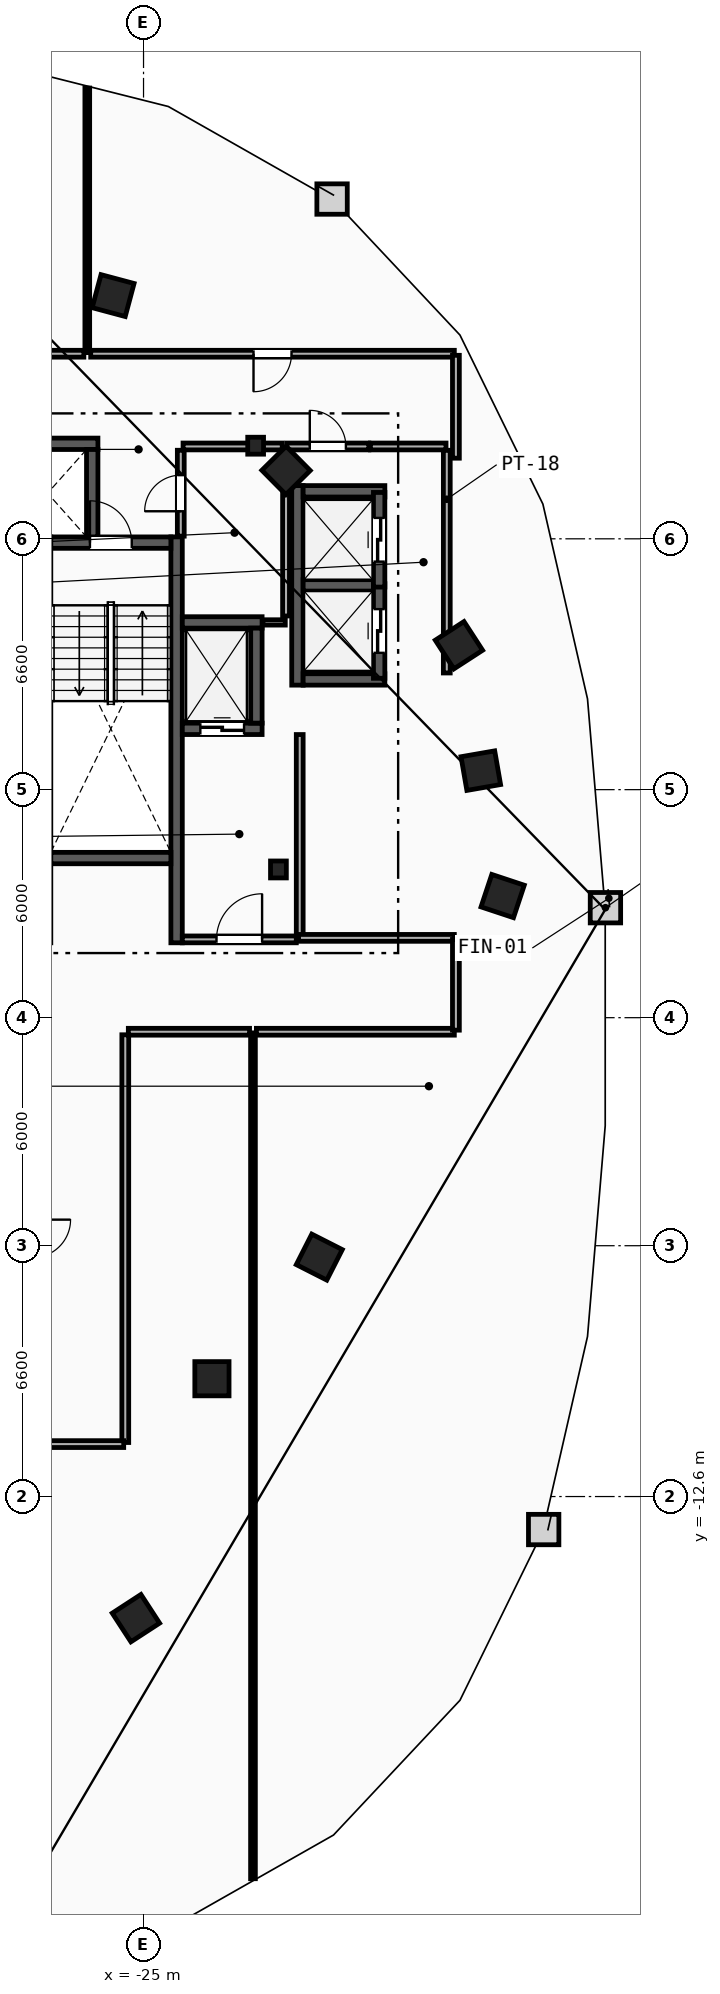
"""IFC4 building model, lengths in metres.
Left out: names, types, materials, properties, quantities, classifications, styles, units other than length and angle.
Written with IfcOpenShell. Run it as: python <this file> out.ifc"""

import sys

from ifc_helpers import new_model, si_unit, direction, frame, frame_2d, origin, origin_2d, place, context, subcontext, project, spatial, rectangle, i_section, extrude, element, fill, save


model = new_model("IFC4")
c1 = context("Model", 3, precision=1e-05, world=origin(), true_north=direction((0.0, 1.0)))
c2 = subcontext(c1, "Body", "Model", "MODEL_VIEW")
j1 = project(units=[si_unit("LENGTHUNIT", "METRE"), si_unit("PLANEANGLEUNIT", "RADIAN")], contexts=[c1])
p1 = place(None, origin())
s1 = spatial("IfcSite", under=j1, at=p1, CompositionType="ELEMENT")
p2 = place(p1, origin())
s2 = spatial("IfcBuilding", under=s1, at=p2, CompositionType="ELEMENT")
p3 = place(p2, frame((0.0, 0.0, 199.0)))
s3 = spatial("IfcBuildingStorey", under=s2, at=p3, CompositionType="ELEMENT", Elevation=199.0)
for number, where, z_axis, x_axis in (
    (1, (-21.45, 3.9, 0.0), (0.0, 0.0, 1.0), (1.0, 0.0, 0.0)),
    (2, (-22.05, 15.05, 0.0), (0.0, 0.0, 1.0), (1.0, 0.0, 0.0)),
):
    element("IfcColumn", number, at=place(p3, frame(where, z_axis=z_axis, x_axis=x_axis)), inside=s3, PredefinedType="COLUMN", context=c2, shape_type="SweptSolid", body=[
        extrude(i_section(OverallWidth=0.416, OverallDepth=0.446, WebThickness=0.039, FlangeThickness=0.063, FilletRadius=0.018, at=origin_2d()), origin(), (0.0, 0.0, 1.0), 3.6),
    ])
for number, where, z_axis, x_axis in (
    (3, (-23.2, -9.5, 0.0), (0.0, 0.0, 1.0), (1.0, 0.0, 0.0)),
    (4, (-15.55, 3.2, 0.0), (0.0, 0.0, 1.0), (0.315, 0.949, 0.0)),
    (5, (-16.125, 6.5, 0.0), (0.0, 0.0, 1.0), (-0.172, 0.985, 0.0)),
    (6, (-16.7, 9.8, 0.0), (0.0, 0.0, 1.0), (-0.544, 0.839, 0.0)),
    (7, (-21.25, 14.4, 0.0), (0.0, 0.0, 1.0), (-0.703, 0.711, 0.0)),
    (8, (-25.8, 19.0, 0.0), (0.0, 0.0, 1.0), (-0.966, 0.259, 0.0)),
    (9, (-25.2, -15.8, 0.0), (0.0, 0.0, 1.0), (0.838, 0.546, 0.0)),
    (10, (-20.375, -6.3, 0.0), (0.0, 0.0, 1.0), (0.453, 0.892, 0.0)),
):
    element("IfcColumn", number, at=place(p3, frame(where, z_axis=z_axis, x_axis=x_axis)), inside=s3, PredefinedType="COLUMN", context=c2, shape_type="SweptSolid", body=[
        extrude(rectangle(XDim=0.9, YDim=0.9, at=origin_2d()), origin(), (0.0, 0.0, 1.0), 3.6),
    ])
p4 = place(p3, frame((-24.13, 1.97, 0.0), z_axis=(0.0, 0.0, 1.0), x_axis=(0.0, 1.0, 0.0)))
e11 = element("IfcWall", 11, at=p4, inside=s3, PredefinedType="SHEAR", context=c2, shape_type="SweptSolid", body=[
    extrude(rectangle(XDim=10.68, YDim=0.3, at=frame_2d((5.34, 0.0))), origin(), (0.0, 0.0, 1.0), 3.34),
])
p5 = place(p3, frame((-27.44, 12.5, 0.0), z_axis=(0.0, 0.0, 1.0), x_axis=(1.0, 0.0, 0.0)))
e12 = element("IfcWall", 12, at=p5, inside=s3, PredefinedType="SHEAR", context=c2, shape_type="SweptSolid", body=[
    extrude(rectangle(XDim=3.16, YDim=0.3, at=frame_2d((1.58, 0.0))), origin(), (0.0, 0.0, 1.0), 3.34),
])
p6 = place(p5, frame((1.03, 0.0, 0.0)))
e13 = element("IfcOpeningElement", 13, at=p6, cuts=e12, PredefinedType="OPENING", context=c2, shape_type="SweptSolid", body=[
    extrude(rectangle(XDim=1.1, YDim=2.15, at=frame_2d((0.55, 1.075))), frame((0.0, 0.16, 0.0), z_axis=(0.0, -1.0, 0.0), x_axis=(1.0, 0.0, 0.0)), (0.0, 0.0, 1.0), 0.32),
])
p7 = place(p3, frame((-27.44, 4.2, 0.0), z_axis=(0.0, 0.0, 1.0), x_axis=(1.0, 0.0, 0.0)))
e14 = element("IfcWall", 14, at=p7, inside=s3, PredefinedType="SHEAR", context=c2, shape_type="SweptSolid", body=[
    extrude(rectangle(XDim=3.16, YDim=0.3, at=frame_2d((1.58, 0.0))), origin(), (0.0, 0.0, 1.0), 3.34),
])
p8 = place(p3, frame((-20.89, 2.15, 0.0), z_axis=(0.0, 0.0, 1.0), x_axis=(0.0, 1.0, 0.0)))
e15 = element("IfcWall", 15, at=p8, inside=s3, PredefinedType="PARTITIONING", context=c2, shape_type="SweptSolid", body=[
    extrude(rectangle(XDim=5.3, YDim=0.18, at=frame_2d((2.65, 0.0))), origin(), (0.0, 0.0, 1.0), 3.34),
])
p9 = place(p3, frame((-23.98, 2.06, 0.0), z_axis=(0.0, 0.0, 1.0), x_axis=(1.0, 0.0, 0.0)))
e16 = element("IfcWall", 16, at=p9, inside=s3, PredefinedType="PARTITIONING", context=c2, shape_type="SweptSolid", body=[
    extrude(rectangle(XDim=3.0, YDim=0.18, at=frame_2d((1.5, 0.0))), origin(), (0.0, 0.0, 1.0), 3.34),
])
p10 = place(p9, frame((0.9, 0.0, 0.0)))
e17 = element("IfcOpeningElement", 17, at=p10, cuts=e16, PredefinedType="OPENING", context=c2, shape_type="SweptSolid", body=[
    extrude(rectangle(XDim=1.2, YDim=2.15, at=frame_2d((0.6, 1.075))), frame((0.0, 0.1, 0.0), z_axis=(0.0, -1.0, 0.0), x_axis=(1.0, 0.0, 0.0)), (0.0, 0.0, 1.0), 0.2),
])
p11 = place(p3, frame((-23.98, 7.6, 0.0), z_axis=(0.0, 0.0, 1.0), x_axis=(1.0, 0.0, 0.0)))
e18 = element("IfcWall", 18, at=p11, inside=s3, PredefinedType="SHEAR", context=c2, shape_type="SweptSolid", body=[
    extrude(rectangle(XDim=2.1, YDim=0.3, at=frame_2d((1.05, 0.0))), origin(), (0.0, 0.0, 1.0), 3.34),
])
p12 = place(p11, frame((0.475, 0.0, 0.0)))
e19 = element("IfcOpeningElement", 19, at=p12, cuts=e18, PredefinedType="OPENING", context=c2, shape_type="SweptSolid", body=[
    extrude(rectangle(XDim=1.15, YDim=2.2, at=frame_2d((0.575, 1.1))), frame((0.0, 0.16, 0.0), z_axis=(0.0, -1.0, 0.0), x_axis=(1.0, 0.0, 0.0)), (0.0, 0.0, 1.0), 0.32),
])
p13 = place(p3, frame((-23.98, 10.4, 0.0), z_axis=(0.0, 0.0, 1.0), x_axis=(1.0, 0.0, 0.0)))
e20 = element("IfcWall", 20, at=p13, inside=s3, PredefinedType="SHEAR", context=c2, shape_type="SweptSolid", body=[
    extrude(rectangle(XDim=2.1, YDim=0.3, at=frame_2d((1.05, 0.0))), origin(), (0.0, 0.0, 1.0), 3.34),
])
for number, where, z_axis, x_axis in (
    (21, (-22.03, 7.75, 0.0), (0.0, 0.0, 1.0), (0.0, 1.0, 0.0)),
    (22, (-28.7, 15.1, 0.0), (0.0, 0.0, 1.0), (1.0, 0.0, 0.0)),
):
    element("IfcWall", number, at=place(p3, frame(where, z_axis=z_axis, x_axis=x_axis)), inside=s3, PredefinedType="SHEAR", context=c2, shape_type="SweptSolid", body=[
        extrude(rectangle(XDim=2.5, YDim=0.3, at=frame_2d((1.25, 0.0))), origin(), (0.0, 0.0, 1.0), 3.34),
    ])
p14 = place(p3, frame((-26.35, 12.65, 0.0), z_axis=(0.0, 0.0, 1.0), x_axis=(0.0, 1.0, 0.0)))
e23 = element("IfcWall", 23, at=p14, inside=s3, PredefinedType="SHEAR", context=c2, shape_type="SweptSolid", body=[
    extrude(rectangle(XDim=2.3, YDim=0.3, at=frame_2d((1.15, 0.0))), origin(), (0.0, 0.0, 1.0), 3.34),
])
p15 = place(p3, frame((-20.95, 8.75, 0.0), z_axis=(0.0, 0.0, 1.0), x_axis=(0.0, 1.0, 0.0)))
e24 = element("IfcWall", 24, at=p15, inside=s3, PredefinedType="SHEAR", context=c2, shape_type="SweptSolid", body=[
    extrude(rectangle(XDim=5.25, YDim=0.3, at=frame_2d((2.625, 0.0))), origin(), (0.0, 0.0, 1.0), 3.34),
])
for number, where, z_axis, x_axis in (
    (25, (-20.8, 8.9, 0.0), (0.0, 0.0, 1.0), (1.0, 0.0, 0.0)),
    (26, (-20.8, 13.85, 0.0), (0.0, 0.0, 1.0), (1.0, 0.0, 0.0)),
):
    element("IfcWall", number, at=place(p3, frame(where, z_axis=z_axis, x_axis=x_axis)), inside=s3, PredefinedType="SHEAR", context=c2, shape_type="SweptSolid", body=[
        extrude(rectangle(XDim=2.15, YDim=0.3, at=frame_2d((1.075, 0.0))), origin(), (0.0, 0.0, 1.0), 3.34),
    ])
p16 = place(p3, frame((-20.8, 11.375, 0.0), z_axis=(0.0, 0.0, 1.0), x_axis=(1.0, 0.0, 0.0)))
e27 = element("IfcWall", 27, at=p16, inside=s3, PredefinedType="SHEAR", context=c2, shape_type="SweptSolid", body=[
    extrude(rectangle(XDim=1.85, YDim=0.3, at=frame_2d((0.925, 0.0))), origin(), (0.0, 0.0, 1.0), 3.34),
])
p17 = place(p3, frame((-18.8, 8.93, 0.0), z_axis=(0.0, 0.0, 1.0), x_axis=(0.0, 1.0, 0.0)))
e28 = element("IfcWall", 28, at=p17, inside=s3, PredefinedType="SHEAR", context=c2, shape_type="SweptSolid", body=[
    extrude(rectangle(XDim=2.49, YDim=0.3, at=frame_2d((1.245, 0.0))), origin(), (0.0, 0.0, 1.0), 3.34),
])
p18 = place(p17, frame((0.67, 0.0, 0.0)))
e29 = element("IfcOpeningElement", 29, at=p18, cuts=e28, PredefinedType="OPENING", context=c2, shape_type="SweptSolid", body=[
    extrude(rectangle(XDim=1.15, YDim=2.2, at=frame_2d((0.575, 1.1))), frame((0.0, 0.16, 0.0), z_axis=(0.0, -1.0, 0.0), x_axis=(1.0, 0.0, 0.0)), (0.0, 0.0, 1.0), 0.32),
])
p19 = place(p3, frame((-18.8, 11.33, 0.0), z_axis=(0.0, 0.0, 1.0), x_axis=(0.0, 1.0, 0.0)))
e30 = element("IfcWall", 30, at=p19, inside=s3, PredefinedType="SHEAR", context=c2, shape_type="SweptSolid", body=[
    extrude(rectangle(XDim=2.49, YDim=0.3, at=frame_2d((1.245, 0.0))), origin(), (0.0, 0.0, 1.0), 3.34),
])
p20 = place(p19, frame((0.67, 0.0, 0.0)))
e31 = element("IfcOpeningElement", 31, at=p20, cuts=e30, PredefinedType="OPENING", context=c2, shape_type="SweptSolid", body=[
    extrude(rectangle(XDim=1.15, YDim=2.2, at=frame_2d((0.575, 1.1))), frame((0.0, 0.16, 0.0), z_axis=(0.0, -1.0, 0.0), x_axis=(1.0, 0.0, 0.0)), (0.0, 0.0, 1.0), 0.32),
])
p21 = place(p3, frame((-17.02, 9.07, 0.0), z_axis=(0.0, 0.0, 1.0), x_axis=(0.0, 1.0, 0.0)))
e32 = element("IfcWall", 32, at=p21, inside=s3, PredefinedType="PARTITIONING", context=c2, shape_type="SweptSolid", body=[
    extrude(rectangle(XDim=5.86, YDim=0.18, at=frame_2d((2.93, 0.0))), origin(), (0.0, 0.0, 1.0), 3.34),
])
p22 = place(p3, frame((-21.23, 15.03, 0.0), z_axis=(0.0, 0.0, 1.0), x_axis=(1.0, 0.0, 0.0)))
e33 = element("IfcWall", 33, at=p22, inside=s3, PredefinedType="PARTITIONING", context=c2, shape_type="SweptSolid", body=[
    extrude(rectangle(XDim=2.16, YDim=0.18, at=frame_2d((1.08, 0.0))), origin(), (0.0, 0.0, 1.0), 3.34),
])
p23 = place(p22, frame((0.605, 0.0, 0.0)))
e34 = element("IfcOpeningElement", 34, at=p23, cuts=e33, PredefinedType="OPENING", context=c2, shape_type="SweptSolid", body=[
    extrude(rectangle(XDim=0.95, YDim=2.1, at=frame_2d((0.475, 1.05))), frame((0.0, 0.1, 0.0), z_axis=(0.0, -1.0, 0.0), x_axis=(1.0, 0.0, 0.0)), (0.0, 0.0, 1.0), 0.2),
])
p24 = place(p3, frame((-19.03, 15.03, 0.0), z_axis=(0.0, 0.0, 1.0), x_axis=(1.0, 0.0, 0.0)))
e35 = element("IfcWall", 35, at=p24, inside=s3, PredefinedType="PARTITIONING", context=c2, shape_type="SweptSolid", body=[
    extrude(rectangle(XDim=1.99, YDim=0.18, at=frame_2d((0.995, 0.0))), origin(), (0.0, 0.0, 1.0), 3.34),
])
p25 = place(p3, frame((-21.86, 10.4, 0.0), z_axis=(0.0, 0.0, 1.0), x_axis=(1.0, 0.0, 0.0)))
e36 = element("IfcWall", 36, at=p25, inside=s3, PredefinedType="PARTITIONING", context=c2, shape_type="SweptSolid", body=[
    extrude(rectangle(XDim=0.59, YDim=0.14, at=frame_2d((0.295, 0.0))), origin(), (0.0, 0.0, 1.0), 3.34),
])
p26 = place(p3, frame((-21.25, 10.57, 0.0), z_axis=(0.0, 0.0, 1.0), x_axis=(0.0, 1.0, 0.0)))
e37 = element("IfcWall", 37, at=p26, inside=s3, PredefinedType="PARTITIONING", context=c2, shape_type="SweptSolid", body=[
    extrude(rectangle(XDim=4.36, YDim=0.18, at=frame_2d((2.18, 0.0))), origin(), (0.0, 0.0, 1.0), 3.34),
])
p27 = place(p3, frame((-23.96, 15.03, 0.0), z_axis=(0.0, 0.0, 1.0), x_axis=(1.0, 0.0, 0.0)))
e38 = element("IfcWall", 38, at=p27, inside=s3, PredefinedType="PARTITIONING", context=c2, shape_type="SweptSolid", body=[
    extrude(rectangle(XDim=2.61, YDim=0.18, at=frame_2d((1.305, 0.0))), origin(), (0.0, 0.0, 1.0), 2.413),
])
p28 = place(p3, frame((-24.02, 12.67, 0.0), z_axis=(0.0, 0.0, 1.0), x_axis=(0.0, 1.0, 0.0)))
e39 = element("IfcWall", 39, at=p28, inside=s3, PredefinedType="PARTITIONING", context=c2, shape_type="SweptSolid", body=[
    extrude(rectangle(XDim=2.26, YDim=0.18, at=frame_2d((1.13, 0.0))), origin(), (0.0, 0.0, 1.0), 3.34),
])
p29 = place(p28, frame((0.655, 0.0, 0.0)))
e40 = element("IfcOpeningElement", 40, at=p29, cuts=e39, PredefinedType="OPENING", context=c2, shape_type="SweptSolid", body=[
    extrude(rectangle(XDim=0.95, YDim=2.1, at=frame_2d((0.475, 1.05))), frame((0.0, 0.1, 0.0), z_axis=(0.0, -1.0, 0.0), x_axis=(1.0, 0.0, 0.0)), (0.0, 0.0, 1.0), 0.2),
])
p30 = place(p3, frame((-22.12, -22.656, 0.0), z_axis=(0.0, 0.0, 1.0), x_axis=(0.0, 1.0, 0.0)))
e41 = element("IfcWall", 41, at=p30, inside=s3, PredefinedType="PARTITIONING", context=c2, shape_type="SweptSolid", body=[
    extrude(rectangle(XDim=22.256, YDim=0.125, at=frame_2d((11.128, 0.0))), origin(), (0.0, 0.0, 1.0), 2.724),
])
p31 = place(p3, frame((-26.48, 17.5, 0.0), z_axis=(0.0, 0.0, 1.0), x_axis=(0.0, 1.0, 0.0)))
e42 = element("IfcWall", 42, at=p31, inside=s3, PredefinedType="PARTITIONING", context=c2, shape_type="SweptSolid", body=[
    extrude(rectangle(XDim=6.961, YDim=0.125, at=frame_2d((3.48, 0.0))), origin(), (0.0, 0.0, 1.0), 3.34),
])
p32 = place(p3, frame((-25.48, -11.178, 0.0), z_axis=(0.0, 0.0, 1.0), x_axis=(0.0, 1.0, 0.0)))
e43 = element("IfcWall", 43, at=p32, inside=s3, PredefinedType="PARTITIONING", context=c2, shape_type="SweptSolid", body=[
    extrude(rectangle(XDim=10.729, YDim=0.18, at=frame_2d((5.364, 0.0))), origin(), (0.0, 0.0, 1.0), 3.34),
])
p33 = place(p3, frame((-25.4, -0.37, 0.0), z_axis=(0.0, 0.0, 1.0), x_axis=(1.0, 0.0, 0.0)))
e44 = element("IfcWall", 44, at=p33, inside=s3, PredefinedType="PARTITIONING", context=c2, shape_type="SweptSolid", body=[
    extrude(rectangle(XDim=3.19, YDim=0.18, at=frame_2d((1.595, 0.0))), origin(), (0.0, 0.0, 1.0), 3.34),
])
p34 = place(p3, frame((-27.878, -11.22, 0.0), z_axis=(0.0, 0.0, 1.0), x_axis=(1.0, 0.0, 0.0)))
e45 = element("IfcWall", 45, at=p34, inside=s3, PredefinedType="PARTITIONING", context=c2, shape_type="SweptSolid", body=[
    extrude(rectangle(XDim=2.357, YDim=0.18, at=frame_2d((1.178, 0.0))), origin(), (0.0, 0.0, 1.0), 3.34),
])
p35 = place(p3, frame((-16.822, 17.47, 0.0), z_axis=(0.0, 0.0, 1.0), x_axis=(-1.0, 0.0, 0.0)))
e46 = element("IfcWall", 46, at=p35, inside=s3, PredefinedType="PARTITIONING", context=c2, shape_type="SweptSolid", body=[
    extrude(rectangle(XDim=9.568, YDim=0.18, at=frame_2d((4.784, 0.0))), origin(), (0.0, 0.0, 1.0), 3.34),
])
p36 = place(p35, frame((4.284, 0.0, 0.0)))
e47 = element("IfcOpeningElement", 47, at=p36, cuts=e46, PredefinedType="OPENING", context=c2, shape_type="SweptSolid", body=[
    extrude(rectangle(XDim=1.0, YDim=2.15, at=frame_2d((0.5, 1.075))), frame((0.0, 0.1, 0.0), z_axis=(0.0, -1.0, 0.0), x_axis=(1.0, 0.0, 0.0)), (0.0, 0.0, 1.0), 0.2),
])
p37 = place(p3, frame((-22.03, -0.37, 0.0), z_axis=(0.0, 0.0, 1.0), x_axis=(1.0, 0.0, 0.0)))
e48 = element("IfcWall", 48, at=p37, inside=s3, PredefinedType="PARTITIONING", context=c2, shape_type="SweptSolid", body=[
    extrude(rectangle(XDim=5.208, YDim=0.18, at=frame_2d((2.604, 0.0))), origin(), (0.0, 0.0, 1.0), 3.34),
])
p38 = place(p3, frame((-16.822, 2.1, 0.0), z_axis=(0.0, 0.0, 1.0), x_axis=(-1.0, 0.0, 0.0)))
e49 = element("IfcWall", 49, at=p38, inside=s3, PredefinedType="PARTITIONING", context=c2, shape_type="SweptSolid", body=[
    extrude(rectangle(XDim=4.098, YDim=0.18, at=frame_2d((2.049, 0.0))), origin(), (0.0, 0.0, 1.0), 3.34),
])
p39 = place(p3, frame((-16.78, 14.721, 0.0), z_axis=(0.0, 0.0, 1.0), x_axis=(0.0, 1.0, 0.0)))
e50 = element("IfcWall", 50, at=p39, inside=s3, PredefinedType="PARTITIONING", context=c2, shape_type="SweptSolid", body=[
    extrude(rectangle(XDim=2.707, YDim=0.18, at=frame_2d((1.354, 0.0))), origin(), (0.0, 0.0, 1.0), 3.34),
])
p40 = place(p3, frame((-16.78, -0.329, 0.0), z_axis=(0.0, 0.0, 1.0), x_axis=(0.0, 1.0, 0.0)))
e51 = element("IfcWall", 51, at=p40, inside=s3, PredefinedType="PARTITIONING", context=c2, shape_type="SweptSolid", body=[
    extrude(rectangle(XDim=2.387, YDim=0.18, at=frame_2d((1.194, 0.0))), origin(), (0.0, 0.0, 1.0), 3.34),
])
p41 = place(p3, frame((-26.57, 17.47, 0.0), z_axis=(0.0, 0.0, 1.0), x_axis=(-1.0, 0.0, 0.0)))
e52 = element("IfcWall", 52, at=p41, inside=s3, PredefinedType="PARTITIONING", context=c2, shape_type="SweptSolid", body=[
    extrude(rectangle(XDim=5.42, YDim=0.18, at=frame_2d((2.71, 0.0))), origin(), (0.0, 0.0, 1.0), 3.34),
])
p42 = place(p41, frame((1.91, 0.0, 0.0)))
e53 = element("IfcOpeningElement", 53, at=p42, cuts=e52, PredefinedType="OPENING", context=c2, shape_type="SweptSolid", body=[
    extrude(rectangle(XDim=1.6, YDim=2.2, at=frame_2d((0.8, 1.1))), frame((0.0, 0.1, 0.0), z_axis=(0.0, -1.0, 0.0), x_axis=(1.0, 0.0, 0.0)), (0.0, 0.0, 1.0), 0.2),
])
p43 = place(p6, origin())
e54 = element("IfcDoor", 54, at=p43, inside=s3, OperationType="SINGLE_SWING_LEFT", PredefinedType="DOOR", context=c2, shape_type="SweptSolid", body=[
    extrude(rectangle(XDim=1.1, YDim=2.15, at=frame_2d((0.55, 1.075))), frame((0.0, 0.025, 0.0), z_axis=(0.0, -1.0, 0.0), x_axis=(1.0, 0.0, 0.0)), (0.0, 0.0, 1.0), 0.05),
])
fill(e13, e54)
p44 = place(p10, origin())
e55 = element("IfcDoor", 55, at=p44, inside=s3, OperationType="SINGLE_SWING_RIGHT", PredefinedType="DOOR", context=c2, shape_type="SweptSolid", body=[
    extrude(rectangle(XDim=1.2, YDim=2.15, at=frame_2d((0.6, 1.075))), frame((0.0, 0.025, 0.0), z_axis=(0.0, -1.0, 0.0), x_axis=(1.0, 0.0, 0.0)), (0.0, 0.0, 1.0), 0.05),
])
fill(e17, e55)
p45 = place(p12, origin())
e56 = element("IfcDoor", 56, at=p45, inside=s3, OperationType="SLIDING_TO_LEFT", PredefinedType="TRAPDOOR", context=c2, shape_type="SweptSolid", body=[
    extrude(rectangle(XDim=1.15, YDim=2.2, at=frame_2d((0.575, 1.1))), frame((0.0, 0.025, 0.0), z_axis=(0.0, -1.0, 0.0), x_axis=(1.0, 0.0, 0.0)), (0.0, 0.0, 1.0), 0.05),
])
fill(e19, e56)
p46 = place(p18, origin())
e57 = element("IfcDoor", 57, at=p46, inside=s3, OperationType="SLIDING_TO_LEFT", PredefinedType="TRAPDOOR", context=c2, shape_type="SweptSolid", body=[
    extrude(rectangle(XDim=1.15, YDim=2.2, at=frame_2d((0.575, 1.1))), frame((0.0, 0.025, 0.0), z_axis=(0.0, -1.0, 0.0), x_axis=(1.0, 0.0, 0.0)), (0.0, 0.0, 1.0), 0.05),
])
fill(e29, e57)
p47 = place(p20, origin())
e58 = element("IfcDoor", 58, at=p47, inside=s3, OperationType="SLIDING_TO_LEFT", PredefinedType="TRAPDOOR", context=c2, shape_type="SweptSolid", body=[
    extrude(rectangle(XDim=1.15, YDim=2.2, at=frame_2d((0.575, 1.1))), frame((0.0, 0.025, 0.0), z_axis=(0.0, -1.0, 0.0), x_axis=(1.0, 0.0, 0.0)), (0.0, 0.0, 1.0), 0.05),
])
fill(e31, e58)
p48 = place(p36, origin())
e59 = element("IfcDoor", 59, at=p48, inside=s3, OperationType="SINGLE_SWING_RIGHT", PredefinedType="DOOR", context=c2, shape_type="SweptSolid", body=[
    extrude(rectangle(XDim=1.0, YDim=2.15, at=frame_2d((0.5, 1.075))), frame((0.0, 0.025, 0.0), z_axis=(0.0, -1.0, 0.0), x_axis=(1.0, 0.0, 0.0)), (0.0, 0.0, 1.0), 0.05),
])
fill(e47, e59)
p49 = place(p29, origin())
e60 = element("IfcDoor", 60, at=p49, inside=s3, OperationType="SINGLE_SWING_LEFT", PredefinedType="DOOR", context=c2, shape_type="SweptSolid", body=[
    extrude(rectangle(XDim=0.95, YDim=2.1, at=frame_2d((0.475, 1.05))), frame((0.0, 0.025, 0.0), z_axis=(0.0, -1.0, 0.0), x_axis=(1.0, 0.0, 0.0)), (0.0, 0.0, 1.0), 0.05),
])
fill(e40, e60)
p50 = place(p23, origin())
e61 = element("IfcDoor", 61, at=p50, inside=s3, OperationType="SINGLE_SWING_LEFT", PredefinedType="DOOR", context=c2, shape_type="SweptSolid", body=[
    extrude(rectangle(XDim=0.95, YDim=2.1, at=frame_2d((0.475, 1.05))), frame((0.0, 0.025, 0.0), z_axis=(0.0, -1.0, 0.0), x_axis=(1.0, 0.0, 0.0)), (0.0, 0.0, 1.0), 0.05),
])
fill(e34, e61)
save(model, sys.argv[1])
